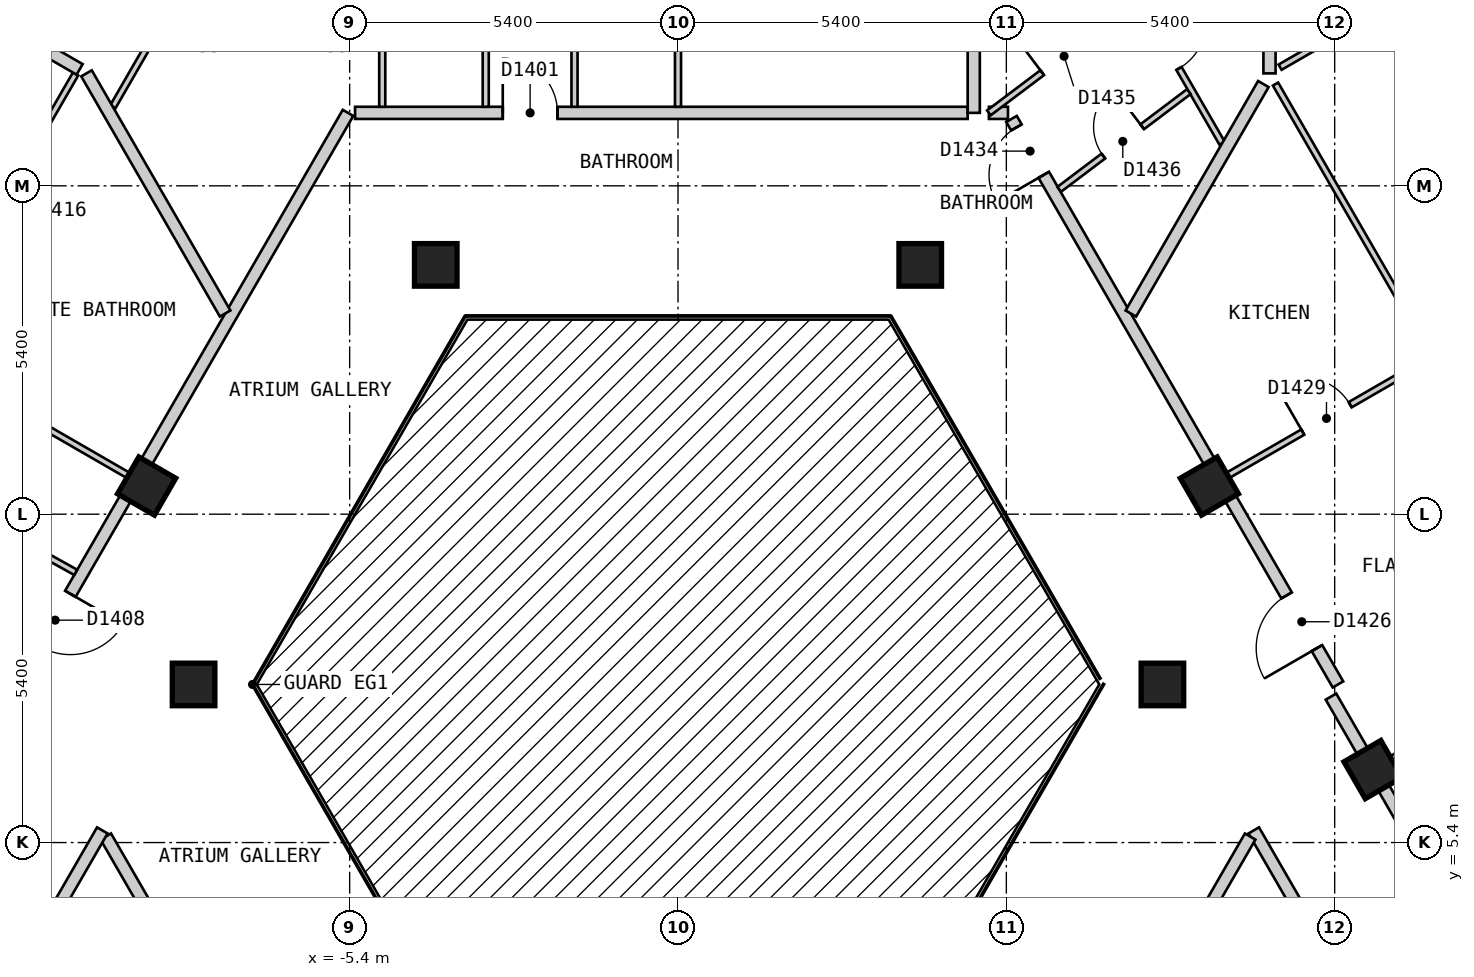
"""IFC4 building model, lengths in metres.
Left out: names, types, materials, properties, quantities, classifications, styles, units other than length and angle.
Written with IfcOpenShell. Run it as: python <this file> out.ifc"""

import sys

from ifc_helpers import new_model, si_unit, direction, frame, frame_2d, origin, origin_2d, place, context, subcontext, project, spatial, rectangle, extrude, element, fill, save


model = new_model("IFC4")
c1 = context("Model", 3, precision=1e-05, world=origin(), true_north=direction((0.0, 1.0)))
c2 = subcontext(c1, "Body", "Model", "MODEL_VIEW")
j1 = project(units=[si_unit("LENGTHUNIT", "METRE"), si_unit("PLANEANGLEUNIT", "RADIAN")], contexts=[c1])
p1 = place(None, origin())
s1 = spatial("IfcSite", under=j1, at=p1, CompositionType="ELEMENT")
p2 = place(p1, origin())
s2 = spatial("IfcBuilding", under=s1, at=p2, CompositionType="ELEMENT")
p3 = place(p2, frame((0.0, 0.0, 178.2)))
s3 = spatial("IfcBuildingStorey", under=s2, at=p3, CompositionType="ELEMENT", Elevation=178.2)
for number, where, z_axis, x_axis in (
    (1, (11.431, 6.6, 0.0), (0.0, 0.0, 1.0), (-0.5, 0.866, 0.0)),
    (2, (7.967, 8.0, 0.0), (0.0, 0.0, 1.0), (1.0, 0.0, 0.0)),
    (3, (8.739, 11.263, 0.0), (0.0, 0.0, 1.0), (-0.5, 0.866, 0.0)),
    (4, (3.984, 14.9, 0.0), (0.0, 0.0, 1.0), (1.0, 0.0, 0.0)),
    (5, (-3.984, 14.9, 0.0), (0.0, 0.0, 1.0), (1.0, 0.0, 0.0)),
    (6, (-8.739, 11.263, 0.0), (0.0, 0.0, 1.0), (-0.5, -0.866, 0.0)),
    (7, (-7.967, 8.0, 0.0), (0.0, 0.0, 1.0), (1.0, 0.0, 0.0)),
):
    element("IfcColumn", number, at=place(p3, frame(where, z_axis=z_axis, x_axis=x_axis)), inside=s3, PredefinedType="COLUMN", context=c2, shape_type="SweptSolid", body=[
        extrude(rectangle(XDim=0.7, YDim=0.7, at=origin_2d()), origin(), (0.0, 0.0, 1.0), 3.0),
    ])
p4 = place(p3, frame((-9.411, 5.5, 0.0), z_axis=(0.0, 0.0, 1.0), x_axis=(0.500018099276, -0.86601495391, 0.0)))
e8 = element("IfcWall", 8, at=p4, inside=s3, PredefinedType="PARTITIONING", context=c2, shape_type="SweptSolid", body=[
    extrude(rectangle(XDim=4.765, YDim=0.2, at=frame_2d((2.383, 0.0))), origin(), (0.0, 0.0, 1.0), 2.7),
])
p5 = place(p3, frame((9.469, 5.6, 0.0), z_axis=(0.0, 0.0, 1.0), x_axis=(0.499964524401, -0.866045884662, 0.0)))
e9 = element("IfcWall", 9, at=p5, inside=s3, PredefinedType="PARTITIONING", context=c2, shape_type="SweptSolid", body=[
    extrude(rectangle(XDim=7.042, YDim=0.2, at=frame_2d((3.521, 0.0))), origin(), (0.0, 0.0, 1.0), 2.7),
])
p6 = place(p5, frame((3.129, 0.0, 0.0)))
e10 = element("IfcOpeningElement", 10, at=p6, cuts=e9, PredefinedType="OPENING", context=c2, shape_type="SweptSolid", body=[
    extrude(rectangle(XDim=0.9, YDim=2.1, at=frame_2d((0.45, 1.05))), frame((0.0, 0.11, 0.0), z_axis=(0.0, -1.0, 0.0), x_axis=(1.0, 0.0, 0.0)), (0.0, 0.0, 1.0), 0.22),
])
p7 = place(p3, frame((10.739, 7.8, 0.0), z_axis=(0.0, 0.0, 1.0), x_axis=(0.499964311759, -0.86604600742, 0.0)))
e11 = element("IfcWall", 11, at=p7, inside=s3, PredefinedType="PARTITIONING", context=c2, shape_type="SweptSolid", body=[
    extrude(rectangle(XDim=9.583, YDim=0.2, at=frame_2d((4.792, 0.0))), origin(), (0.0, 0.0, 1.0), 2.7),
])
p8 = place(p3, frame((5.485, 17.3, 0.0), z_axis=(0.0, 0.0, 1.0), x_axis=(0.499965832213, -0.866045129667, 0.0)))
e12 = element("IfcWall", 12, at=p8, inside=s3, PredefinedType="PARTITIONING", context=c2, shape_type="SweptSolid", body=[
    extrude(rectangle(XDim=10.739, YDim=0.2, at=frame_2d((5.369, 0.0))), origin(), (0.0, 0.0, 1.0), 2.7),
])
p9 = place(p8, frame((9.048, 0.0, 0.0)))
e13 = element("IfcOpeningElement", 13, at=p9, cuts=e12, PredefinedType="OPENING", context=c2, shape_type="SweptSolid", body=[
    extrude(rectangle(XDim=1.0, YDim=2.1, at=frame_2d((0.5, 1.05))), frame((0.0, 0.11, 0.0), z_axis=(0.0, -1.0, 0.0), x_axis=(1.0, 0.0, 0.0)), (0.0, 0.0, 1.0), 0.22),
])
p10 = place(p8, frame((0.161, 0.0, 0.0)))
e14 = element("IfcOpeningElement", 14, at=p10, cuts=e12, PredefinedType="OPENING", context=c2, shape_type="SweptSolid", body=[
    extrude(rectangle(XDim=0.9, YDim=2.1, at=frame_2d((0.45, 1.05))), frame((0.0, 0.11, 0.0), z_axis=(0.0, -1.0, 0.0), x_axis=(1.0, 0.0, 0.0)), (0.0, 0.0, 1.0), 0.22),
])
p11 = place(p3, frame((-5.311, 17.4, 0.0), z_axis=(0.0, 0.0, 1.0), x_axis=(1.0, 0.0, 0.0)))
e15 = element("IfcWall", 15, at=p11, inside=s3, PredefinedType="PARTITIONING", context=c2, shape_type="SweptSolid", body=[
    extrude(rectangle(XDim=10.075, YDim=0.2, at=frame_2d((5.038, 0.0))), origin(), (0.0, 0.0, 1.0), 2.7),
])
p12 = place(p11, frame((2.429, 0.0, 0.0)))
e16 = element("IfcOpeningElement", 16, at=p12, cuts=e15, PredefinedType="OPENING", context=c2, shape_type="SweptSolid", body=[
    extrude(rectangle(XDim=0.9, YDim=2.1, at=frame_2d((0.45, 1.05))), frame((0.0, 0.11, 0.0), z_axis=(0.0, -1.0, 0.0), x_axis=(1.0, 0.0, 0.0)), (0.0, 0.0, 1.0), 0.22),
])
p13 = place(p3, frame((5.113, 17.4, 0.0), z_axis=(0.0, 0.0, 1.0), x_axis=(1.0, 0.0, 0.0)))
e17 = element("IfcWall", 17, at=p13, inside=s3, PredefinedType="PARTITIONING", context=c2, shape_type="SweptSolid", body=[
    extrude(rectangle(XDim=0.314, YDim=0.2, at=frame_2d((0.157, 0.0))), origin(), (0.0, 0.0, 1.0), 2.7),
])
p14 = place(p3, frame((7.028, 1.373, 0.0), z_axis=(0.0, 0.0, 1.0), x_axis=(0.499953126767, 0.866052464367, 0.0)))
e18 = element("IfcWall", 18, at=p14, inside=s3, PredefinedType="PARTITIONING", context=c2, shape_type="SweptSolid", body=[
    extrude(rectangle(XDim=4.764, YDim=0.2, at=frame_2d((2.382, 0.0))), origin(), (0.0, 0.0, 1.0), 2.7),
])
p15 = place(p3, frame((-13.048, -0.601, 0.0), z_axis=(0.0, 0.0, 1.0), x_axis=(0.499982180423, 0.866035691677, 0.0)))
e19 = element("IfcWall", 19, at=p15, inside=s3, PredefinedType="PARTITIONING", context=c2, shape_type="SweptSolid", body=[
    extrude(rectangle(XDim=7.16, YDim=0.2, at=frame_2d((3.58, 0.0))), origin(), (0.0, 0.0, 1.0), 2.7),
])
p16 = place(p15, frame((3.13, 0.0, 0.0)))
e20 = element("IfcOpeningElement", 20, at=p16, cuts=e19, PredefinedType="OPENING", context=c2, shape_type="SweptSolid", body=[
    extrude(rectangle(XDim=0.9, YDim=2.1, at=frame_2d((0.45, 1.05))), frame((0.0, 0.11, 0.0), z_axis=(0.0, -1.0, 0.0), x_axis=(1.0, 0.0, 0.0)), (0.0, 0.0, 1.0), 0.22),
])
p17 = place(p3, frame((-10.854, 8.0, 0.0), z_axis=(0.0, 0.0, 1.0), x_axis=(0.499997637144, 0.866026767976, 0.0)))
e21 = element("IfcWall", 21, at=p17, inside=s3, PredefinedType="PARTITIONING", context=c2, shape_type="SweptSolid", body=[
    extrude(rectangle(XDim=10.854, YDim=0.2, at=frame_2d((5.427, 0.0))), origin(), (0.0, 0.0, 1.0), 2.7),
])
p18 = place(p17, frame((0.721, 0.0, 0.0)))
e22 = element("IfcOpeningElement", 22, at=p18, cuts=e21, PredefinedType="OPENING", context=c2, shape_type="SweptSolid", body=[
    extrude(rectangle(XDim=1.0, YDim=2.1, at=frame_2d((0.5, 1.05))), frame((0.0, 0.11, 0.0), z_axis=(0.0, -1.0, 0.0), x_axis=(1.0, 0.0, 0.0)), (0.0, 0.0, 1.0), 0.22),
])
p19 = place(p3, frame((7.073, 20.15, 0.0), z_axis=(0.0, 0.0, 1.0), x_axis=(0.499917691695, -0.866072919292, 0.0)))
e23 = element("IfcWall", 23, at=p19, inside=s3, PredefinedType="PARTITIONING", context=c2, shape_type="SweptSolid", body=[
    extrude(rectangle(XDim=3.753, YDim=0.1, at=frame_2d((1.876, 0.0))), origin(), (0.0, 0.0, 1.0), 2.7),
])
p20 = place(p19, frame((1.432, 0.0, 0.0)))
e24 = element("IfcOpeningElement", 24, at=p20, cuts=e23, PredefinedType="OPENING", context=c2, shape_type="SweptSolid", body=[
    extrude(rectangle(XDim=0.9, YDim=2.1, at=frame_2d((0.45, 1.05))), frame((0.0, 0.06, 0.0), z_axis=(0.0, -1.0, 0.0), x_axis=(1.0, 0.0, 0.0)), (0.0, 0.0, 1.0), 0.12),
])
p21 = place(p3, frame((9.827, 17.874, 0.0), z_axis=(0.0, 0.0, 1.0), x_axis=(0.499962189394, -0.866047232647, 0.0)))
e25 = element("IfcWall", 25, at=p21, inside=s3, PredefinedType="PARTITIONING", context=c2, shape_type="SweptSolid", body=[
    extrude(rectangle(XDim=11.401, YDim=0.1, at=frame_2d((5.701, 0.0))), origin(), (0.0, 0.0, 1.0), 2.7),
])
p22 = place(p21, frame((7.433, 0.0, 0.0)))
e26 = element("IfcOpeningElement", 26, at=p22, cuts=e25, PredefinedType="OPENING", context=c2, shape_type="SweptSolid", body=[
    extrude(rectangle(XDim=0.9, YDim=2.1, at=frame_2d((0.45, 1.05))), frame((0.0, 0.06, 0.0), z_axis=(0.0, -1.0, 0.0), x_axis=(1.0, 0.0, 0.0)), (0.0, 0.0, 1.0), 0.12),
])
p23 = place(p3, frame((-4.864, 20.769, 0.0), z_axis=(0.0, 0.0, 1.0), x_axis=(0.0, -1.0, 0.0)))
e27 = element("IfcWall", 27, at=p23, inside=s3, PredefinedType="PARTITIONING", context=c2, shape_type="SweptSolid", body=[
    extrude(rectangle(XDim=3.269, YDim=0.1, at=frame_2d((1.635, 0.0))), origin(), (0.0, 0.0, 1.0), 2.7),
])
p24 = place(p3, frame((0.0, 20.43, 0.0), z_axis=(0.0, 0.0, 1.0), x_axis=(0.0, -1.0, 0.0)))
e28 = element("IfcWall", 28, at=p24, inside=s3, PredefinedType="PARTITIONING", context=c2, shape_type="SweptSolid", body=[
    extrude(rectangle(XDim=2.93, YDim=0.1, at=frame_2d((1.465, 0.0))), origin(), (0.0, 0.0, 1.0), 2.7),
])
p25 = place(p3, frame((-13.444, 11.814, 0.0), z_axis=(0.0, 0.0, 1.0), x_axis=(0.873653620945, -0.486548405207, 0.0)))
e29 = element("IfcWall", 29, at=p25, inside=s3, PredefinedType="PARTITIONING", context=c2, shape_type="SweptSolid", body=[
    extrude(rectangle(XDim=4.051, YDim=0.1, at=frame_2d((2.025, 0.0))), origin(), (0.0, 0.0, 1.0), 2.7),
])
p26 = place(p25, frame((1.65, 0.0, 0.0)))
e30 = element("IfcOpeningElement", 30, at=p26, cuts=e29, PredefinedType="OPENING", context=c2, shape_type="SweptSolid", body=[
    extrude(rectangle(XDim=0.8, YDim=2.1, at=frame_2d((0.4, 1.05))), frame((0.0, 0.06, 0.0), z_axis=(0.0, -1.0, 0.0), x_axis=(1.0, 0.0, 0.0)), (0.0, 0.0, 1.0), 0.12),
])
p27 = place(p3, frame((-9.295, 17.5, 0.0), z_axis=(0.0, 0.0, 1.0), x_axis=(0.500060839138, 0.865990275442, 0.0)))
e31 = element("IfcWall", 31, at=p27, inside=s3, PredefinedType="PARTITIONING", context=c2, shape_type="SweptSolid", body=[
    extrude(rectangle(XDim=3.81, YDim=0.1, at=frame_2d((1.905, 0.0))), origin(), (0.0, 0.0, 1.0), 2.7),
])
p28 = place(p27, frame((2.079, 0.0, 0.0)))
e32 = element("IfcOpeningElement", 32, at=p28, cuts=e31, PredefinedType="OPENING", context=c2, shape_type="SweptSolid", body=[
    extrude(rectangle(XDim=0.8, YDim=2.1, at=frame_2d((0.4, 1.05))), frame((0.0, 0.06, 0.0), z_axis=(0.0, -1.0, 0.0), x_axis=(1.0, 0.0, 0.0)), (0.0, 0.0, 1.0), 0.12),
])
p29 = place(p3, frame((-15.704, 8.0, 0.0), z_axis=(0.0, 0.0, 1.0), x_axis=(0.500005637941, 0.866022148693, 0.0)))
e33 = element("IfcWall", 33, at=p29, inside=s3, PredefinedType="PARTITIONING", context=c2, shape_type="SweptSolid", body=[
    extrude(rectangle(XDim=11.592, YDim=0.1, at=frame_2d((5.796, 0.0))), origin(), (0.0, 0.0, 1.0), 2.7),
])
p30 = place(p29, frame((3.132, 0.0, 0.0)))
e34 = element("IfcOpeningElement", 34, at=p30, cuts=e33, PredefinedType="OPENING", context=c2, shape_type="SweptSolid", body=[
    extrude(rectangle(XDim=0.9, YDim=2.1, at=frame_2d((0.45, 1.05))), frame((0.0, 0.06, 0.0), z_axis=(0.0, -1.0, 0.0), x_axis=(1.0, 0.0, 0.0)), (0.0, 0.0, 1.0), 0.12),
])
p31 = place(p29, frame((8.6, 0.0, 0.0)))
e35 = element("IfcOpeningElement", 35, at=p31, cuts=e33, PredefinedType="OPENING", context=c2, shape_type="SweptSolid", body=[
    extrude(rectangle(XDim=0.8, YDim=2.1, at=frame_2d((0.4, 1.05))), frame((0.0, 0.06, 0.0), z_axis=(0.0, -1.0, 0.0), x_axis=(1.0, 0.0, 0.0)), (0.0, 0.0, 1.0), 0.12),
])
p32 = place(p3, frame((-3.162, 17.5, 0.0), z_axis=(0.0, 0.0, 1.0), x_axis=(0.0, 1.0, 0.0)))
e36 = element("IfcWall", 36, at=p32, inside=s3, PredefinedType="PARTITIONING", context=c2, shape_type="SweptSolid", body=[
    extrude(rectangle(XDim=2.959, YDim=0.1, at=frame_2d((1.479, 0.0))), origin(), (0.0, 0.0, 1.0), 2.7),
])
p33 = place(p32, frame((0.98, 0.0, 0.0)))
e37 = element("IfcOpeningElement", 37, at=p33, cuts=e36, PredefinedType="OPENING", context=c2, shape_type="SweptSolid", body=[
    extrude(rectangle(XDim=0.9, YDim=2.1, at=frame_2d((0.45, 1.05))), frame((0.0, 0.06, 0.0), z_axis=(0.0, -1.0, 0.0), x_axis=(1.0, 0.0, 0.0)), (0.0, 0.0, 1.0), 0.12),
])
p34 = place(p3, frame((-1.702, 17.5, 0.0), z_axis=(0.0, 0.0, 1.0), x_axis=(0.0, 1.0, 0.0)))
e38 = element("IfcWall", 38, at=p34, inside=s3, PredefinedType="PARTITIONING", context=c2, shape_type="SweptSolid", body=[
    extrude(rectangle(XDim=2.91, YDim=0.1, at=frame_2d((1.455, 0.0))), origin(), (0.0, 0.0, 1.0), 2.7),
])
p35 = place(p34, frame((1.03, 0.0, 0.0)))
e39 = element("IfcOpeningElement", 39, at=p35, cuts=e38, PredefinedType="OPENING", context=c2, shape_type="SweptSolid", body=[
    extrude(rectangle(XDim=0.8, YDim=2.1, at=frame_2d((0.4, 1.05))), frame((0.0, 0.06, 0.0), z_axis=(0.0, -1.0, 0.0), x_axis=(1.0, 0.0, 0.0)), (0.0, 0.0, 1.0), 0.12),
])
p36 = place(p3, frame((11.518, 6.65, 0.0), z_axis=(0.0, 0.0, 1.0), x_axis=(0.865949381454, 0.500131651427, 0.0)))
e40 = element("IfcWall", 40, at=p36, inside=s3, PredefinedType="PARTITIONING", context=c2, shape_type="SweptSolid", body=[
    extrude(rectangle(XDim=4.097, YDim=0.1, at=frame_2d((2.049, 0.0))), origin(), (0.0, 0.0, 1.0), 2.7),
])
p37 = place(p36, frame((1.623, 0.0, 0.0)))
e41 = element("IfcOpeningElement", 41, at=p37, cuts=e40, PredefinedType="OPENING", context=c2, shape_type="SweptSolid", body=[
    extrude(rectangle(XDim=0.8, YDim=2.1, at=frame_2d((0.4, 1.05))), frame((0.0, 0.06, 0.0), z_axis=(0.0, -1.0, 0.0), x_axis=(1.0, 0.0, 0.0)), (0.0, 0.0, 1.0), 0.12),
])
p38 = place(p3, frame((8.999, 11.413, 0.0), z_axis=(0.0, 0.0, 1.0), x_axis=(0.865969252911, 0.500097243556, 0.0)))
e42 = element("IfcWall", 42, at=p38, inside=s3, PredefinedType="PARTITIONING", context=c2, shape_type="SweptSolid", body=[
    extrude(rectangle(XDim=3.947, YDim=0.1, at=frame_2d((1.974, 0.0))), origin(), (0.0, 0.0, 1.0), 2.7),
])
p39 = place(p38, frame((1.474, 0.0, 0.0)))
e43 = element("IfcOpeningElement", 43, at=p39, cuts=e42, PredefinedType="OPENING", context=c2, shape_type="SweptSolid", body=[
    extrude(rectangle(XDim=0.9, YDim=2.1, at=frame_2d((0.45, 1.05))), frame((0.0, 0.06, 0.0), z_axis=(0.0, -1.0, 0.0), x_axis=(1.0, 0.0, 0.0)), (0.0, 0.0, 1.0), 0.12),
])
p40 = place(p3, frame((9.902, 18.151, 0.0), z_axis=(0.0, 0.0, 1.0), x_axis=(0.866032278734, 0.499988092049, 0.0)))
e44 = element("IfcWall", 44, at=p40, inside=s3, PredefinedType="PARTITIONING", context=c2, shape_type="SweptSolid", body=[
    extrude(rectangle(XDim=5.649, YDim=0.1, at=frame_2d((2.824, 0.0))), origin(), (0.0, 0.0, 1.0), 2.7),
])
p41 = place(p40, frame((2.274, 0.0, 0.0)))
e45 = element("IfcOpeningElement", 45, at=p41, cuts=e44, PredefinedType="OPENING", context=c2, shape_type="SweptSolid", body=[
    extrude(rectangle(XDim=0.9, YDim=2.1, at=frame_2d((0.45, 1.05))), frame((0.0, 0.06, 0.0), z_axis=(0.0, -1.0, 0.0), x_axis=(1.0, 0.0, 0.0)), (0.0, 0.0, 1.0), 0.12),
])
p42 = place(p3, frame((6.269, 16.142, 0.0), z_axis=(0.0, 0.0, 1.0), x_axis=(0.798549086509, 0.601929693931, 0.0)))
e46 = element("IfcWall", 46, at=p42, inside=s3, PredefinedType="PARTITIONING", context=c2, shape_type="SweptSolid", body=[
    extrude(rectangle(XDim=2.67, YDim=0.1, at=frame_2d((1.335, 0.0))), origin(), (0.0, 0.0, 1.0), 2.7),
])
p43 = place(p42, frame((0.91, 0.0, 0.0)))
e47 = element("IfcOpeningElement", 47, at=p43, cuts=e46, PredefinedType="OPENING", context=c2, shape_type="SweptSolid", body=[
    extrude(rectangle(XDim=0.8, YDim=2.1, at=frame_2d((0.4, 1.05))), frame((0.0, 0.06, 0.0), z_axis=(0.0, -1.0, 0.0), x_axis=(1.0, 0.0, 0.0)), (0.0, 0.0, 1.0), 0.12),
])
p44 = place(p3, frame((5.113, 17.4, 0.0), z_axis=(0.0, 0.0, 1.0), x_axis=(0.798718434647, 0.601704962714, 0.0)))
e48 = element("IfcWall", 48, at=p44, inside=s3, PredefinedType="PARTITIONING", context=c2, shape_type="SweptSolid", body=[
    extrude(rectangle(XDim=3.045, YDim=0.1, at=frame_2d((1.522, 0.0))), origin(), (0.0, 0.0, 1.0), 2.7),
])
p45 = place(p44, frame((1.098, 0.0, 0.0)))
e49 = element("IfcOpeningElement", 49, at=p45, cuts=e48, PredefinedType="OPENING", context=c2, shape_type="SweptSolid", body=[
    extrude(rectangle(XDim=0.9, YDim=2.1, at=frame_2d((0.45, 1.05))), frame((0.0, 0.06, 0.0), z_axis=(0.0, -1.0, 0.0), x_axis=(1.0, 0.0, 0.0)), (0.0, 0.0, 1.0), 0.12),
])
p46 = place(p3, frame((-9.728, 18.05, 0.0), z_axis=(0.0, 0.0, 1.0), x_axis=(0.499921709333, -0.866070600204, 0.0)))
e50 = element("IfcWall", 50, at=p46, inside=s3, PredefinedType="PARTITIONING", context=c2, shape_type="SweptSolid", body=[
    extrude(rectangle(XDim=4.561, YDim=0.2, at=frame_2d((2.28, 0.0))), origin(), (0.0, 0.0, 1.0), 2.7),
])
p47 = place(p3, frame((-14.794, 20.975, 0.0), z_axis=(0.0, 0.0, 1.0), x_axis=(0.865982978614, -0.500073475352, 0.0)))
e51 = element("IfcWall", 51, at=p47, inside=s3, PredefinedType="PARTITIONING", context=c2, shape_type="SweptSolid", body=[
    extrude(rectangle(XDim=5.719, YDim=0.2, at=frame_2d((2.86, 0.0))), origin(), (0.0, 0.0, 1.0), 2.7),
])
p48 = place(p3, frame((7.448, 14.1, 0.0), z_axis=(0.0, 0.0, 1.0), x_axis=(0.500013426303, 0.866017651966, 0.0)))
e52 = element("IfcWall", 52, at=p48, inside=s3, PredefinedType="PARTITIONING", context=c2, shape_type="SweptSolid", body=[
    extrude(rectangle(XDim=4.358, YDim=0.2, at=frame_2d((2.179, 0.0))), origin(), (0.0, 0.0, 1.0), 2.7),
])
p49 = place(p3, frame((4.864, 17.4, 0.0), z_axis=(0.0, 0.0, 1.0), x_axis=(0.0, 1.0, 0.0)))
e53 = element("IfcWall", 53, at=p49, inside=s3, PredefinedType="PARTITIONING", context=c2, shape_type="SweptSolid", body=[
    extrude(rectangle(XDim=2.82, YDim=0.2, at=frame_2d((1.41, 0.0))), origin(), (0.0, 0.0, 1.0), 2.7),
])
p50 = place(p3, frame((9.728, 18.049, 0.0), z_axis=(0.0, 0.0, 1.0), x_axis=(0.0, 1.0, 0.0)))
e54 = element("IfcWall", 54, at=p50, inside=s3, PredefinedType="PARTITIONING", context=c2, shape_type="SweptSolid", body=[
    extrude(rectangle(XDim=5.851, YDim=0.2, at=frame_2d((2.925, 0.0))), origin(), (0.0, 0.0, 1.0), 2.7),
])
p51 = place(p3, frame((-12.55, 13.463, 0.0), z_axis=(0.0, 0.0, 1.0), x_axis=(0.86606561423, -0.499930346997, 0.0)))
e55 = element("IfcWall", 55, at=p51, inside=s3, PredefinedType="PARTITIONING", context=c2, shape_type="SweptSolid", body=[
    extrude(rectangle(XDim=4.1, YDim=0.1, at=frame_2d((2.05, 0.0))), origin(), (0.0, 0.0, 1.0), 2.7),
])
p52 = place(p12, origin())
e56 = element("IfcDoor", 56, at=p52, inside=s3, OperationType="SINGLE_SWING_LEFT", PredefinedType="DOOR", context=c2, shape_type="SweptSolid", body=[
    extrude(rectangle(XDim=0.9, YDim=2.1, at=frame_2d((0.45, 1.05))), frame((0.0, 0.025, 0.0), z_axis=(0.0, -1.0, 0.0), x_axis=(1.0, 0.0, 0.0)), (0.0, 0.0, 1.0), 0.05),
])
fill(e16, e56)
p53 = place(p18, origin())
e57 = element("IfcDoor", 57, at=p53, inside=s3, OperationType="SINGLE_SWING_RIGHT", PredefinedType="DOOR", context=c2, shape_type="SweptSolid", body=[
    extrude(rectangle(XDim=1.0, YDim=2.1, at=frame_2d((0.5, 1.05))), frame((0.0, 0.025, 0.0), z_axis=(0.0, -1.0, 0.0), x_axis=(1.0, 0.0, 0.0)), (0.0, 0.0, 1.0), 0.05),
])
fill(e22, e57)
p54 = place(p9, origin())
e58 = element("IfcDoor", 58, at=p54, inside=s3, OperationType="SINGLE_SWING_RIGHT", PredefinedType="DOOR", context=c2, shape_type="SweptSolid", body=[
    extrude(rectangle(XDim=1.0, YDim=2.1, at=frame_2d((0.5, 1.05))), frame((0.0, 0.025, 0.0), z_axis=(0.0, -1.0, 0.0), x_axis=(1.0, 0.0, 0.0)), (0.0, 0.0, 1.0), 0.05),
])
fill(e13, e58)
p55 = place(p39, origin())
e59 = element("IfcDoor", 59, at=p55, inside=s3, OperationType="SINGLE_SWING_LEFT", PredefinedType="DOOR", context=c2, shape_type="SweptSolid", body=[
    extrude(rectangle(XDim=0.9, YDim=2.1, at=frame_2d((0.45, 1.05))), frame((0.0, 0.025, 0.0), z_axis=(0.0, -1.0, 0.0), x_axis=(1.0, 0.0, 0.0)), (0.0, 0.0, 1.0), 0.05),
])
fill(e43, e59)
p56 = place(p10, origin())
e60 = element("IfcDoor", 60, at=p56, inside=s3, OperationType="SINGLE_SWING_RIGHT", PredefinedType="DOOR", context=c2, shape_type="SweptSolid", body=[
    extrude(rectangle(XDim=0.9, YDim=2.1, at=frame_2d((0.45, 1.05))), frame((0.0, 0.025, 0.0), z_axis=(0.0, -1.0, 0.0), x_axis=(1.0, 0.0, 0.0)), (0.0, 0.0, 1.0), 0.05),
])
fill(e14, e60)
p57 = place(p45, origin())
e61 = element("IfcDoor", 61, at=p57, inside=s3, OperationType="SINGLE_SWING_LEFT", PredefinedType="DOOR", context=c2, shape_type="SweptSolid", body=[
    extrude(rectangle(XDim=0.9, YDim=2.1, at=frame_2d((0.45, 1.05))), frame((0.0, 0.025, 0.0), z_axis=(0.0, -1.0, 0.0), x_axis=(1.0, 0.0, 0.0)), (0.0, 0.0, 1.0), 0.05),
])
fill(e49, e61)
p58 = place(p43, origin())
e62 = element("IfcDoor", 62, at=p58, inside=s3, OperationType="SINGLE_SWING_RIGHT", PredefinedType="DOOR", context=c2, shape_type="SweptSolid", body=[
    extrude(rectangle(XDim=0.8, YDim=2.1, at=frame_2d((0.4, 1.05))), frame((0.0, 0.025, 0.0), z_axis=(0.0, -1.0, 0.0), x_axis=(1.0, 0.0, 0.0)), (0.0, 0.0, 1.0), 0.05),
])
fill(e47, e62)
p59 = place(p20, origin())
e63 = element("IfcDoor", 63, at=p59, inside=s3, OperationType="SINGLE_SWING_LEFT", PredefinedType="DOOR", context=c2, shape_type="SweptSolid", body=[
    extrude(rectangle(XDim=0.9, YDim=2.1, at=frame_2d((0.45, 1.05))), frame((0.0, 0.025, 0.0), z_axis=(0.0, -1.0, 0.0), x_axis=(1.0, 0.0, 0.0)), (0.0, 0.0, 1.0), 0.05),
])
fill(e24, e63)
save(model, sys.argv[1])
